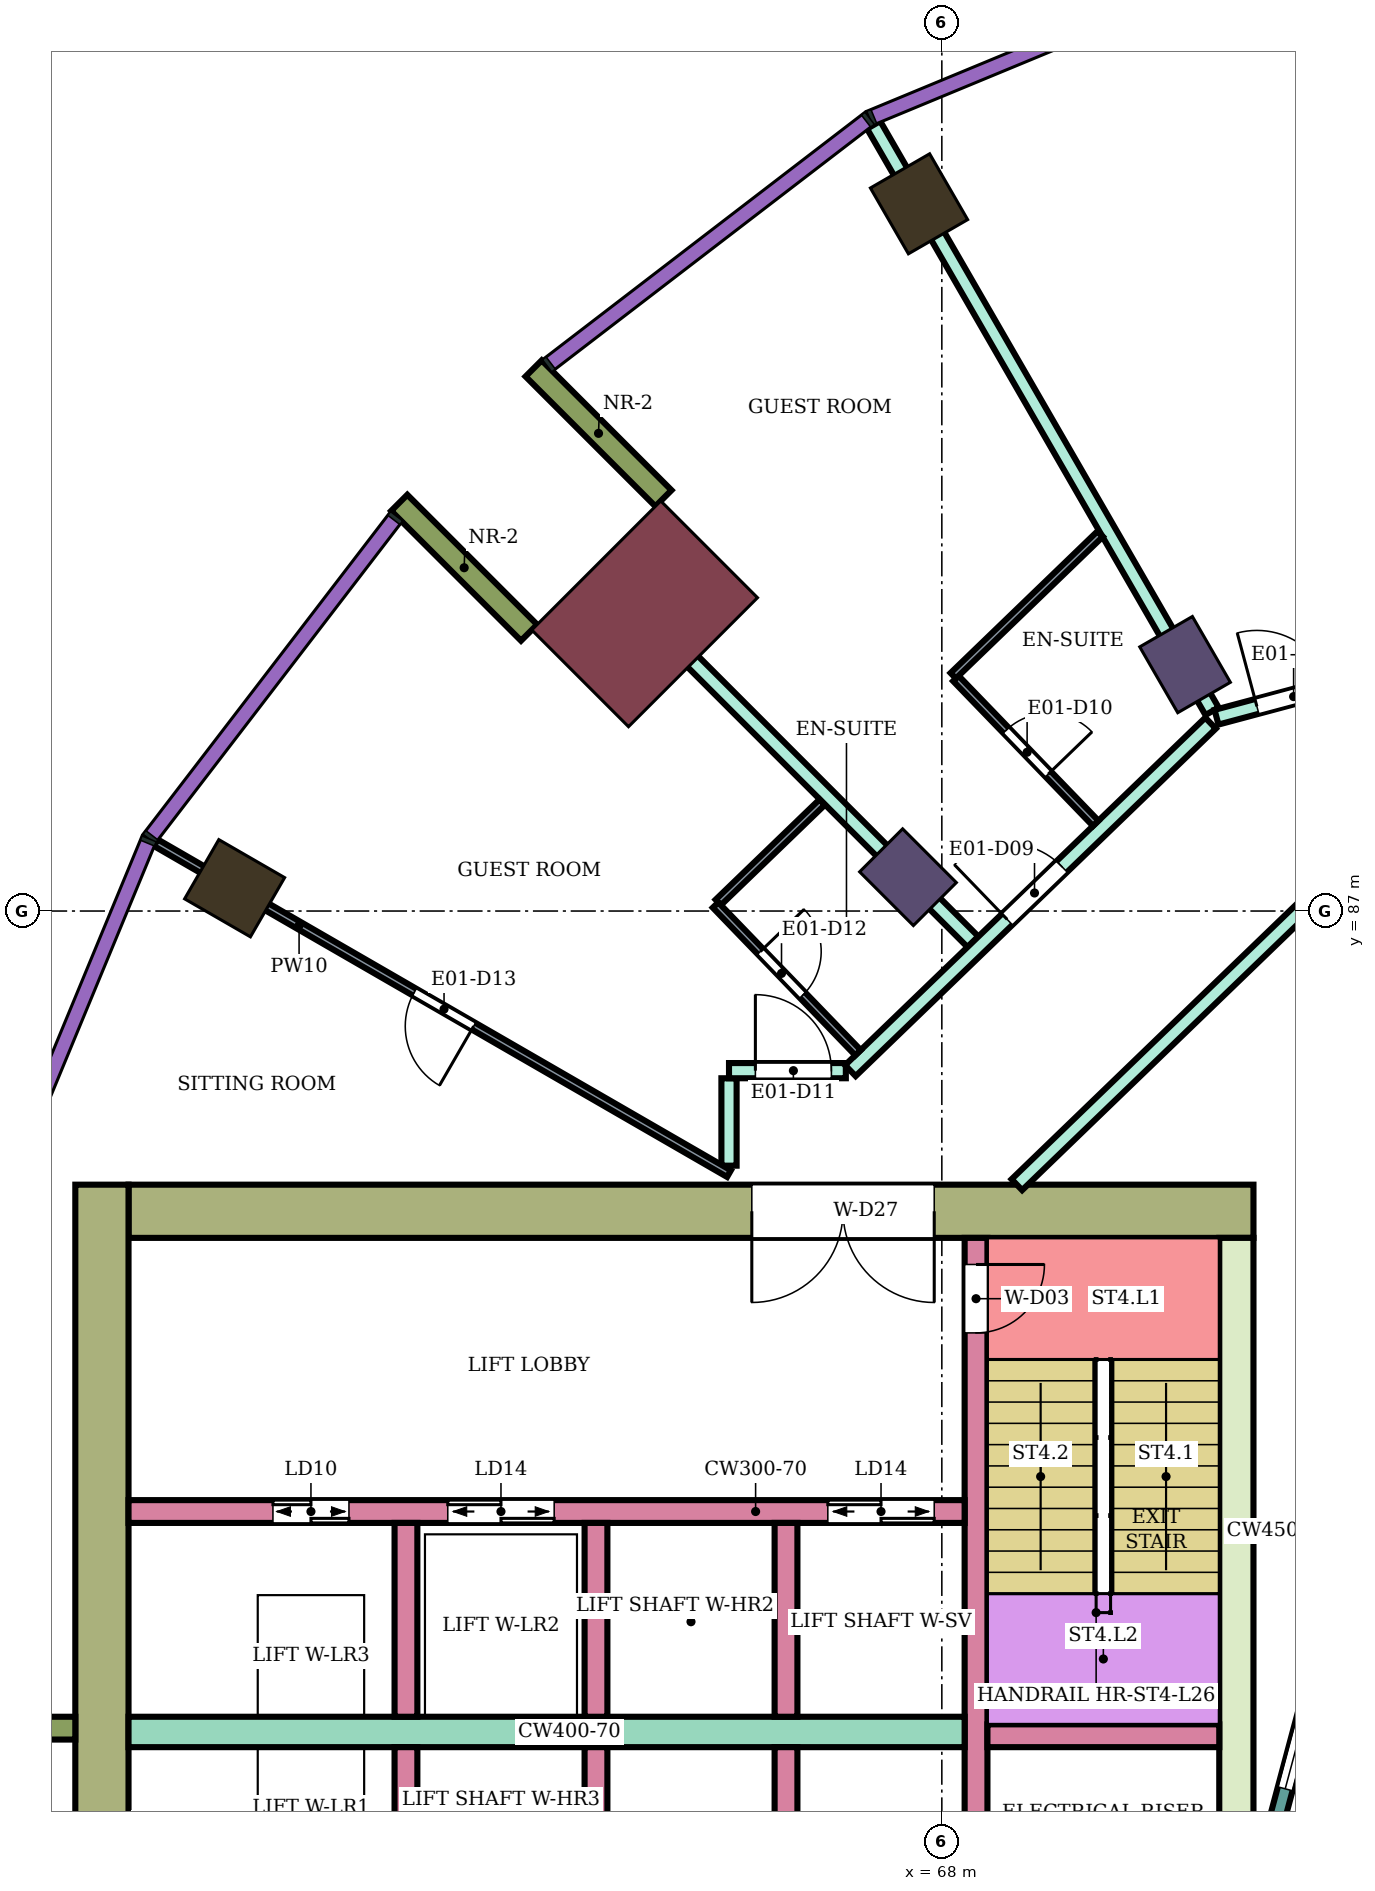
"""IFC4 building model, lengths in metres.
Left out: names, types, materials, properties, quantities, classifications, styles, units other than length and angle.
Written with IfcOpenShell. Run it as: python <this file> out.ifc"""

import sys

from ifc_helpers import new_model, si_unit, direction, frame, frame_2d, origin, origin_2d, place, context, subcontext, project, spatial, rectangle, extrude, element, fill, save


model = new_model("IFC4")
c1 = context("Model", 3, precision=1e-05, world=origin(), true_north=direction((0.0, 1.0)))
c2 = subcontext(c1, "Body", "Model", "MODEL_VIEW")
j1 = project(units=[si_unit("LENGTHUNIT", "METRE"), si_unit("PLANEANGLEUNIT", "RADIAN")], contexts=[c1])
p1 = place(None, origin())
s1 = spatial("IfcSite", under=j1, at=p1, CompositionType="ELEMENT")
p2 = place(p1, origin())
s2 = spatial("IfcBuilding", under=s1, at=p2, CompositionType="ELEMENT")
p3 = place(p2, frame((0.0, 0.0, 114.6)))
s3 = spatial("IfcBuildingStorey", under=s2, at=p3, CompositionType="ELEMENT", Elevation=114.6)
for number, where, z_axis, x_axis in (
    (1, (67.7, 96.304, 0.0), (0.0, 0.0, 1.0), (-0.5, 0.866, 0.0)),
    (2, (58.696, 87.3, 0.0), (0.0, 0.0, 1.0), (-0.866, 0.5, 0.0)),
):
    element("IfcColumn", number, at=place(p3, frame(where, z_axis=z_axis, x_axis=x_axis)), inside=s3, PredefinedType="COLUMN", context=c2, shape_type="SweptSolid", body=[
        extrude(rectangle(XDim=1.0, YDim=0.9, at=origin_2d()), origin(), (0.0, 0.0, 1.0), 3.9),
    ])
for number, where, z_axis, x_axis in (
    (3, (71.2, 90.242, 0.0), (0.0, 0.0, 1.0), (-0.5, 0.866, 0.0)),
    (4, (67.555, 87.445, 0.0), (0.0, 0.0, 1.0), (-0.707, 0.707, 0.0)),
):
    element("IfcColumn", number, at=place(p3, frame(where, z_axis=z_axis, x_axis=x_axis)), inside=s3, PredefinedType="COLUMN", context=c2, shape_type="SweptSolid", body=[
        extrude(rectangle(XDim=1.0, YDim=0.8, at=origin_2d()), origin(), (0.0, 0.0, 1.0), 3.9),
    ])
p4 = place(p3, frame((64.09, 90.91, 0.0), z_axis=(0.0, 0.0, 1.0), x_axis=(-0.707106781187, 0.707106781187, 0.0)))
e5 = element("IfcColumn", 5, at=p4, inside=s3, PredefinedType="COLUMN", context=c2, shape_type="SweptSolid", body=[
    extrude(rectangle(XDim=1.8, YDim=2.4, at=origin_2d()), origin(), (0.0, 0.0, 1.0), 3.9),
])
p5 = place(p3, frame((72.1, 83.05, 0.0), z_axis=(0.0, 0.0, 1.0), x_axis=(-1.0, 0.0, 0.0)))
e6 = element("IfcWall", 6, at=p5, inside=s3, PredefinedType="SHEAR", context=c2, shape_type="SweptSolid", body=[
    extrude(rectangle(XDim=14.8, YDim=0.7, at=frame_2d((7.4, 0.0))), origin(), (0.0, 0.0, 1.0), 3.58),
])
p6 = place(p5, frame((4.2, 0.0, 0.0)))
e7 = element("IfcOpeningElement", 7, at=p6, cuts=e6, PredefinedType="OPENING", context=c2, shape_type="SweptSolid", body=[
    extrude(rectangle(XDim=2.4, YDim=2.4, at=frame_2d((1.2, 1.2))), frame((0.0, 0.36, 0.0), z_axis=(0.0, -1.0, 0.0), x_axis=(1.0, 0.0, 0.0)), (0.0, 0.0, 1.0), 0.72),
])
p7 = place(p3, frame((71.875, 82.7, 0.0), z_axis=(0.0, 0.0, 1.0), x_axis=(0.0, -1.0, 0.0)))
e8 = element("IfcWall", 8, at=p7, inside=s3, PredefinedType="SHEAR", context=c2, shape_type="SweptSolid", body=[
    extrude(rectangle(XDim=7.7, YDim=0.45, at=frame_2d((3.85, 0.0))), origin(), (0.0, 0.0, 1.0), 3.58),
])
p8 = place(p3, frame((56.95, 83.4, 0.0), z_axis=(0.0, 0.0, 1.0), x_axis=(0.0, -1.0, 0.0)))
e9 = element("IfcWall", 9, at=p8, inside=s3, PredefinedType="SHEAR", context=c2, shape_type="SweptSolid", body=[
    extrude(rectangle(XDim=16.8, YDim=0.7, at=frame_2d((8.4, 0.0))), origin(), (0.0, 0.0, 1.0), 3.58),
])
p9 = place(p3, frame((68.45, 82.7, 0.0), z_axis=(0.0, 0.0, 1.0), x_axis=(0.0, -1.0, 0.0)))
e10 = element("IfcWall", 10, at=p9, inside=s3, PredefinedType="SHEAR", context=c2, shape_type="SweptSolid", body=[
    extrude(rectangle(XDim=7.7, YDim=0.3, at=frame_2d((3.85, 0.0))), origin(), (0.0, 0.0, 1.0), 3.58),
])
p10 = place(p9, frame((0.35, 0.0, 0.0)))
e11 = element("IfcOpeningElement", 11, at=p10, cuts=e10, PredefinedType="OPENING", context=c2, shape_type="SweptSolid", body=[
    extrude(rectangle(XDim=0.9, YDim=2.1, at=frame_2d((0.45, 1.05))), frame((0.0, 0.16, 0.0), z_axis=(0.0, -1.0, 0.0), x_axis=(1.0, 0.0, 0.0)), (0.0, 0.0, 1.0), 0.32),
])
p11 = place(p3, frame((71.65, 76.15, 0.0), z_axis=(0.0, 0.0, 1.0), x_axis=(-1.0, 0.0, 0.0)))
e12 = element("IfcWall", 12, at=p11, inside=s3, PredefinedType="SHEAR", context=c2, shape_type="SweptSolid", body=[
    extrude(rectangle(XDim=3.05, YDim=0.3, at=frame_2d((1.525, 0.0))), origin(), (0.0, 0.0, 1.0), 3.58),
])
p12 = place(p3, frame((68.3, 76.2, 0.0), z_axis=(0.0, 0.0, 1.0), x_axis=(-1.0, 0.0, 0.0)))
e13 = element("IfcWall", 13, at=p12, inside=s3, PredefinedType="SHEAR", context=c2, shape_type="SweptSolid", body=[
    extrude(rectangle(XDim=11.0, YDim=0.4, at=frame_2d((5.5, 0.0))), origin(), (0.0, 0.0, 1.0), 3.58),
])
p13 = place(p3, frame((68.3, 79.1, 0.0), z_axis=(0.0, 0.0, 1.0), x_axis=(-1.0, 0.0, 0.0)))
e14 = element("IfcWall", 14, at=p13, inside=s3, PredefinedType="SHEAR", context=c2, shape_type="SweptSolid", body=[
    extrude(rectangle(XDim=11.0, YDim=0.3, at=frame_2d((5.5, 0.0))), origin(), (0.0, 0.0, 1.0), 3.58),
])
p14 = place(p13, frame((0.4, 0.0, 0.0)))
e15 = element("IfcOpeningElement", 15, at=p14, cuts=e14, PredefinedType="OPENING", context=c2, shape_type="SweptSolid", body=[
    extrude(rectangle(XDim=1.4, YDim=2.1, at=frame_2d((0.7, 1.05))), frame((0.0, 0.16, 0.0), z_axis=(0.0, -1.0, 0.0), x_axis=(1.0, 0.0, 0.0)), (0.0, 0.0, 1.0), 0.32),
])
p15 = place(p13, frame((5.4, 0.0, 0.0)))
e16 = element("IfcOpeningElement", 16, at=p15, cuts=e14, PredefinedType="OPENING", context=c2, shape_type="SweptSolid", body=[
    extrude(rectangle(XDim=1.4, YDim=2.1, at=frame_2d((0.7, 1.05))), frame((0.0, 0.16, 0.0), z_axis=(0.0, -1.0, 0.0), x_axis=(1.0, 0.0, 0.0)), (0.0, 0.0, 1.0), 0.32),
])
p16 = place(p13, frame((8.1, 0.0, 0.0)))
e17 = element("IfcOpeningElement", 17, at=p16, cuts=e14, PredefinedType="OPENING", context=c2, shape_type="SweptSolid", body=[
    extrude(rectangle(XDim=1.0, YDim=2.1, at=frame_2d((0.5, 1.05))), frame((0.0, 0.16, 0.0), z_axis=(0.0, -1.0, 0.0), x_axis=(1.0, 0.0, 0.0)), (0.0, 0.0, 1.0), 0.32),
])
for number, where, z_axis, x_axis in (
    (18, (65.95, 76.0, 0.0), (0.0, 0.0, 1.0), (0.0, -1.0, 0.0)),
    (19, (63.45, 76.0, 0.0), (0.0, 0.0, 1.0), (0.0, -1.0, 0.0)),
    (20, (60.95, 76.0, 0.0), (0.0, 0.0, 1.0), (0.0, -1.0, 0.0)),
    (21, (65.95, 78.95, 0.0), (0.0, 0.0, 1.0), (0.0, -1.0, 0.0)),
    (22, (63.45, 78.95, 0.0), (0.0, 0.0, 1.0), (0.0, -1.0, 0.0)),
    (23, (60.95, 78.95, 0.0), (0.0, 0.0, 1.0), (0.0, -1.0, 0.0)),
):
    element("IfcWall", number, at=place(p3, frame(where, z_axis=z_axis, x_axis=x_axis)), inside=s3, PredefinedType="SHEAR", context=c2, shape_type="SweptSolid", body=[
        extrude(rectangle(XDim=2.55, YDim=0.3, at=frame_2d((1.275, 0.0))), origin(), (0.0, 0.0, 1.0), 3.58),
    ])
for number, where, z_axis, x_axis in (
    (24, (64.338, 92.43, 0.0), (0.0, 0.0, 1.0), (-0.707, 0.707, 0.0)),
    (25, (62.57, 90.662, 0.0), (0.0, 0.0, 1.0), (-0.707, 0.707, 0.0)),
    (26, (56.6, 76.25, 0.0), (0.0, 0.0, 1.0), (-1.0, 0.0, 0.0)),
):
    element("IfcWall", number, at=place(p3, frame(where, z_axis=z_axis, x_axis=x_axis)), inside=s3, PredefinedType="NOTDEFINED", context=c2, shape_type="SweptSolid", body=[
        extrude(rectangle(XDim=2.416, YDim=0.3, at=frame_2d((1.208, 0.0))), origin(), (0.0, 0.0, 1.0), 3.9),
    ])
p17 = place(p3, frame((73.415, 78.802, 0.0), z_axis=(0.0, 0.0, 1.0), x_axis=(-0.258789828301, -0.965933654434, 0.0)))
e27 = element("IfcWall", 27, at=p17, inside=s3, PredefinedType="NOTDEFINED", context=c2, shape_type="SweptSolid", body=[
    extrude(rectangle(XDim=3.936, YDim=0.2, at=frame_2d((1.968, 0.0))), origin(), (0.0, 0.0, 1.0), 3.9),
])
p18 = place(p17, frame((0.468, 0.0, 0.9)))
e28 = element("IfcOpeningElement", 28, at=p18, cuts=e27, PredefinedType="OPENING", context=c2, shape_type="SweptSolid", body=[
    extrude(rectangle(XDim=3.0, YDim=2.3, at=frame_2d((1.5, 1.15))), frame((0.0, 0.11, 0.0), z_axis=(0.0, -1.0, 0.0), x_axis=(1.0, 0.0, 0.0)), (0.0, 0.0, 1.0), 0.22),
])
p19 = place(p3, frame((63.598, 91.408, 0.0), z_axis=(0.0, 0.0, 1.0), x_axis=(0.706963264491, -0.707250268759, 0.0)))
e29 = element("IfcWall", 29, at=p19, inside=s3, PredefinedType="PARTITIONING", context=c2, shape_type="SweptSolid", body=[
    extrude(rectangle(XDim=6.805, YDim=0.2, at=frame_2d((3.403, 0.0))), origin(), (0.0, 0.0, 1.0), 3.45),
])
p20 = place(p3, frame((65.2, 83.65, 0.0), z_axis=(0.0, 0.0, 1.0), x_axis=(0.0, 1.0, 0.0)))
e30 = element("IfcWall", 30, at=p20, inside=s3, PredefinedType="PARTITIONING", context=c2, shape_type="SweptSolid", body=[
    extrude(rectangle(XDim=1.15, YDim=0.2, at=frame_2d((0.575, 0.0))), origin(), (0.0, 0.0, 1.0), 3.45),
])
p21 = place(p3, frame((65.2, 84.9, 0.0), z_axis=(0.0, 0.0, 1.0), x_axis=(1.0, 0.0, 0.0)))
e31 = element("IfcWall", 31, at=p21, inside=s3, PredefinedType="PARTITIONING", context=c2, shape_type="SweptSolid", body=[
    extrude(rectangle(XDim=1.537, YDim=0.2, at=frame_2d((0.769, 0.0))), origin(), (0.0, 0.0, 1.0), 3.45),
])
p22 = place(p21, frame((0.347, 0.0, 0.0)))
e32 = element("IfcOpeningElement", 32, at=p22, cuts=e31, PredefinedType="OPENING", context=c2, shape_type="SweptSolid", body=[
    extrude(rectangle(XDim=1.0, YDim=2.1, at=frame_2d((0.5, 1.05))), frame((0.0, 0.11, 0.0), z_axis=(0.0, -1.0, 0.0), x_axis=(1.0, 0.0, 0.0)), (0.0, 0.0, 1.0), 0.22),
])
p23 = place(p3, frame((66.797, 84.9, 0.0), z_axis=(0.0, 0.0, 1.0), x_axis=(0.719692092412, 0.694293376116, 0.0)))
e33 = element("IfcWall", 33, at=p23, inside=s3, PredefinedType="PARTITIONING", context=c2, shape_type="SweptSolid", body=[
    extrude(rectangle(XDim=6.584, YDim=0.2, at=frame_2d((3.292, 0.0))), origin(), (0.0, 0.0, 1.0), 3.45),
])
p24 = place(p23, frame((2.866, 0.0, 0.0)))
e34 = element("IfcOpeningElement", 34, at=p24, cuts=e33, PredefinedType="OPENING", context=c2, shape_type="SweptSolid", body=[
    extrude(rectangle(XDim=1.0, YDim=2.1, at=frame_2d((0.5, 1.05))), frame((0.0, 0.11, 0.0), z_axis=(0.0, -1.0, 0.0), x_axis=(1.0, 0.0, 0.0)), (0.0, 0.0, 1.0), 0.22),
])
p25 = place(p3, frame((67.102, 97.342, 0.0), z_axis=(0.0, 0.0, 1.0), x_axis=(0.499927298089, -0.866067374183, 0.0)))
e35 = element("IfcWall", 35, at=p25, inside=s3, PredefinedType="PARTITIONING", context=c2, shape_type="SweptSolid", body=[
    extrude(rectangle(XDim=8.907, YDim=0.2, at=frame_2d((4.454, 0.0))), origin(), (0.0, 0.0, 1.0), 3.45),
])
p26 = place(p3, frame((68.987, 83.4, 0.0), z_axis=(0.0, 0.0, 1.0), x_axis=(0.719586298962, 0.694403022997, 0.0)))
e36 = element("IfcWall", 36, at=p26, inside=s3, PredefinedType="PARTITIONING", context=c2, shape_type="SweptSolid", body=[
    extrude(rectangle(XDim=5.439, YDim=0.2, at=frame_2d((2.719, 0.0))), origin(), (0.0, 0.0, 1.0), 3.45),
])
p27 = place(p3, frame((71.614, 89.55, 0.0), z_axis=(0.0, 0.0, 1.0), x_axis=(0.965967958589, 0.258661753994, 0.0)))
e37 = element("IfcWall", 37, at=p27, inside=s3, PredefinedType="PARTITIONING", context=c2, shape_type="SweptSolid", body=[
    extrude(rectangle(XDim=8.592, YDim=0.2, at=frame_2d((4.296, 0.0))), origin(), (0.0, 0.0, 1.0), 3.45),
])
p28 = place(p27, frame((0.55, 0.0, 0.0)))
e38 = element("IfcOpeningElement", 38, at=p28, cuts=e37, PredefinedType="OPENING", context=c2, shape_type="SweptSolid", body=[
    extrude(rectangle(XDim=1.0, YDim=2.1, at=frame_2d((0.5, 1.05))), frame((0.0, 0.11, 0.0), z_axis=(0.0, -1.0, 0.0), x_axis=(1.0, 0.0, 0.0)), (0.0, 0.0, 1.0), 0.22),
])
p29 = place(p3, frame((57.659, 87.899, 0.0), z_axis=(0.0, 0.0, 1.0), x_axis=(0.86602264145, -0.500004784474, 0.0)))
e39 = element("IfcWall", 39, at=p29, inside=s3, PredefinedType="PARTITIONING", context=c2, shape_type="SweptSolid", body=[
    extrude(rectangle(XDim=8.708, YDim=0.1, at=frame_2d((4.354, 0.0))), origin(), (0.0, 0.0, 1.0), 3.45),
])
p30 = place(p29, frame((3.929, 0.0, 0.0)))
e40 = element("IfcOpeningElement", 40, at=p30, cuts=e39, PredefinedType="OPENING", context=c2, shape_type="SweptSolid", body=[
    extrude(rectangle(XDim=0.9, YDim=2.1, at=frame_2d((0.45, 1.05))), frame((0.0, 0.06, 0.0), z_axis=(0.0, -1.0, 0.0), x_axis=(1.0, 0.0, 0.0)), (0.0, 0.0, 1.0), 0.12),
])
p31 = place(p3, frame((65.059, 87.114, 0.0), z_axis=(0.0, 0.0, 1.0), x_axis=(0.719715847356, 0.694268751324, 0.0)))
e41 = element("IfcWall", 41, at=p31, inside=s3, PredefinedType="PARTITIONING", context=c2, shape_type="SweptSolid", body=[
    extrude(rectangle(XDim=1.9, YDim=0.1, at=frame_2d((0.95, 0.0))), origin(), (0.0, 0.0, 1.0), 3.45),
])
p32 = place(p3, frame((65.023, 87.079, 0.0), z_axis=(0.0, 0.0, 1.0), x_axis=(0.694287838235, -0.719697434815, 0.0)))
e42 = element("IfcWall", 42, at=p32, inside=s3, PredefinedType="PARTITIONING", context=c2, shape_type="SweptSolid", body=[
    extrude(rectangle(XDim=2.7, YDim=0.1, at=frame_2d((1.35, 0.0))), origin(), (0.0, 0.0, 1.0), 3.45),
])
p33 = place(p32, frame((0.85, 0.0, 0.0)))
e43 = element("IfcOpeningElement", 43, at=p33, cuts=e42, PredefinedType="OPENING", context=c2, shape_type="SweptSolid", body=[
    extrude(rectangle(XDim=0.8, YDim=2.1, at=frame_2d((0.4, 1.05))), frame((0.0, 0.06, 0.0), z_axis=(0.0, -1.0, 0.0), x_axis=(1.0, 0.0, 0.0)), (0.0, 0.0, 1.0), 0.12),
])
p34 = place(p3, frame((68.185, 90.06, 0.0), z_axis=(0.0, 0.0, 1.0), x_axis=(0.69446127412, -0.719530081892, 0.0)))
e44 = element("IfcWall", 44, at=p34, inside=s3, PredefinedType="PARTITIONING", context=c2, shape_type="SweptSolid", body=[
    extrude(rectangle(XDim=2.649, YDim=0.1, at=frame_2d((1.324, 0.0))), origin(), (0.0, 0.0, 1.0), 3.45),
])
p35 = place(p34, frame((0.95, 0.0, 0.0)))
e45 = element("IfcOpeningElement", 45, at=p35, cuts=e44, PredefinedType="OPENING", context=c2, shape_type="SweptSolid", body=[
    extrude(rectangle(XDim=0.8, YDim=2.1, at=frame_2d((0.4, 1.05))), frame((0.0, 0.06, 0.0), z_axis=(0.0, -1.0, 0.0), x_axis=(1.0, 0.0, 0.0)), (0.0, 0.0, 1.0), 0.12),
])
p36 = place(p3, frame((68.15, 90.096, 0.0), z_axis=(0.0, 0.0, 1.0), x_axis=(0.719667544954, 0.694318820672, 0.0)))
e46 = element("IfcWall", 46, at=p36, inside=s3, PredefinedType="PARTITIONING", context=c2, shape_type="SweptSolid", body=[
    extrude(rectangle(XDim=2.687, YDim=0.1, at=frame_2d((1.344, 0.0))), origin(), (0.0, 0.0, 1.0), 3.45),
])
p37 = place(p18, origin())
e47 = element("IfcWindow", 47, at=p37, inside=s3, PartitioningType="SINGLE_PANEL", PredefinedType="WINDOW", context=c2, shape_type="SweptSolid", body=[
    extrude(rectangle(XDim=3.0, YDim=2.3, at=frame_2d((1.5, 1.15))), frame((0.0, 0.03, 0.0), z_axis=(0.0, -1.0, 0.0), x_axis=(1.0, 0.0, 0.0)), (0.0, 0.0, 1.0), 0.06),
])
fill(e28, e47)
p38 = place(p28, origin())
e48 = element("IfcDoor", 48, at=p38, inside=s3, OperationType="SINGLE_SWING_LEFT", PredefinedType="DOOR", context=c2, shape_type="SweptSolid", body=[
    extrude(rectangle(XDim=1.0, YDim=2.1, at=frame_2d((0.5, 1.05))), frame((0.0, 0.025, 0.0), z_axis=(0.0, -1.0, 0.0), x_axis=(1.0, 0.0, 0.0)), (0.0, 0.0, 1.0), 0.05),
])
fill(e38, e48)
p39 = place(p24, origin())
e49 = element("IfcDoor", 49, at=p39, inside=s3, OperationType="SINGLE_SWING_LEFT", PredefinedType="DOOR", context=c2, shape_type="SweptSolid", body=[
    extrude(rectangle(XDim=1.0, YDim=2.1, at=frame_2d((0.5, 1.05))), frame((0.0, 0.025, 0.0), z_axis=(0.0, -1.0, 0.0), x_axis=(1.0, 0.0, 0.0)), (0.0, 0.0, 1.0), 0.05),
])
fill(e34, e49)
p40 = place(p35, origin())
e50 = element("IfcDoor", 50, at=p40, inside=s3, OperationType="SINGLE_SWING_RIGHT", PredefinedType="DOOR", context=c2, shape_type="SweptSolid", body=[
    extrude(rectangle(XDim=0.8, YDim=2.1, at=frame_2d((0.4, 1.05))), frame((0.0, 0.025, 0.0), z_axis=(0.0, -1.0, 0.0), x_axis=(1.0, 0.0, 0.0)), (0.0, 0.0, 1.0), 0.05),
])
fill(e45, e50)
p41 = place(p22, origin())
e51 = element("IfcDoor", 51, at=p41, inside=s3, OperationType="SINGLE_SWING_LEFT", PredefinedType="DOOR", context=c2, shape_type="SweptSolid", body=[
    extrude(rectangle(XDim=1.0, YDim=2.1, at=frame_2d((0.5, 1.05))), frame((0.0, 0.025, 0.0), z_axis=(0.0, -1.0, 0.0), x_axis=(1.0, 0.0, 0.0)), (0.0, 0.0, 1.0), 0.05),
])
fill(e32, e51)
p42 = place(p33, origin())
e52 = element("IfcDoor", 52, at=p42, inside=s3, OperationType="SINGLE_SWING_LEFT", PredefinedType="DOOR", context=c2, shape_type="SweptSolid", body=[
    extrude(rectangle(XDim=0.8, YDim=2.1, at=frame_2d((0.4, 1.05))), frame((0.0, 0.025, 0.0), z_axis=(0.0, -1.0, 0.0), x_axis=(1.0, 0.0, 0.0)), (0.0, 0.0, 1.0), 0.05),
])
fill(e43, e52)
p43 = place(p30, frame((0.9, 0.0, 0.0), z_axis=(0.0, 0.0, 1.0), x_axis=(-1.0, 0.0, 0.0)))
e53 = element("IfcDoor", 53, at=p43, inside=s3, OperationType="SINGLE_SWING_LEFT", PredefinedType="DOOR", context=c2, shape_type="SweptSolid", body=[
    extrude(rectangle(XDim=0.9, YDim=2.1, at=frame_2d((0.45, 1.05))), frame((0.0, 0.025, 0.0), z_axis=(0.0, -1.0, 0.0), x_axis=(1.0, 0.0, 0.0)), (0.0, 0.0, 1.0), 0.05),
])
fill(e40, e53)
p44 = place(p10, origin())
e54 = element("IfcDoor", 54, at=p44, inside=s3, OperationType="SINGLE_SWING_LEFT", PredefinedType="DOOR", context=c2, shape_type="SweptSolid", body=[
    extrude(rectangle(XDim=0.9, YDim=2.1, at=frame_2d((0.45, 1.05))), frame((0.0, 0.025, 0.0), z_axis=(0.0, -1.0, 0.0), x_axis=(1.0, 0.0, 0.0)), (0.0, 0.0, 1.0), 0.05),
])
fill(e11, e54)
p45 = place(p14, origin())
e55 = element("IfcDoor", 55, at=p45, inside=s3, OperationType="DOUBLE_DOOR_SLIDING", PredefinedType="DOOR", context=c2, shape_type="SweptSolid", body=[
    extrude(rectangle(XDim=1.4, YDim=2.1, at=frame_2d((0.7, 1.05))), frame((0.0, 0.025, 0.0), z_axis=(0.0, -1.0, 0.0), x_axis=(1.0, 0.0, 0.0)), (0.0, 0.0, 1.0), 0.05),
])
fill(e15, e55)
p46 = place(p15, origin())
e56 = element("IfcDoor", 56, at=p46, inside=s3, OperationType="DOUBLE_DOOR_SLIDING", PredefinedType="DOOR", context=c2, shape_type="SweptSolid", body=[
    extrude(rectangle(XDim=1.4, YDim=2.1, at=frame_2d((0.7, 1.05))), frame((0.0, 0.025, 0.0), z_axis=(0.0, -1.0, 0.0), x_axis=(1.0, 0.0, 0.0)), (0.0, 0.0, 1.0), 0.05),
])
fill(e16, e56)
p47 = place(p16, origin())
e57 = element("IfcDoor", 57, at=p47, inside=s3, OperationType="DOUBLE_DOOR_SLIDING", PredefinedType="DOOR", context=c2, shape_type="SweptSolid", body=[
    extrude(rectangle(XDim=1.0, YDim=2.1, at=frame_2d((0.5, 1.05))), frame((0.0, 0.025, 0.0), z_axis=(0.0, -1.0, 0.0), x_axis=(1.0, 0.0, 0.0)), (0.0, 0.0, 1.0), 0.05),
])
fill(e17, e57)
p48 = place(p6, origin())
e58 = element("IfcDoor", 58, at=p48, inside=s3, OperationType="DOUBLE_DOOR_SINGLE_SWING", PredefinedType="DOOR", context=c2, shape_type="SweptSolid", body=[
    extrude(rectangle(XDim=2.4, YDim=2.4, at=frame_2d((1.2, 1.2))), frame((0.0, 0.025, 0.0), z_axis=(0.0, -1.0, 0.0), x_axis=(1.0, 0.0, 0.0)), (0.0, 0.0, 1.0), 0.05),
])
fill(e7, e58)
save(model, sys.argv[1])
